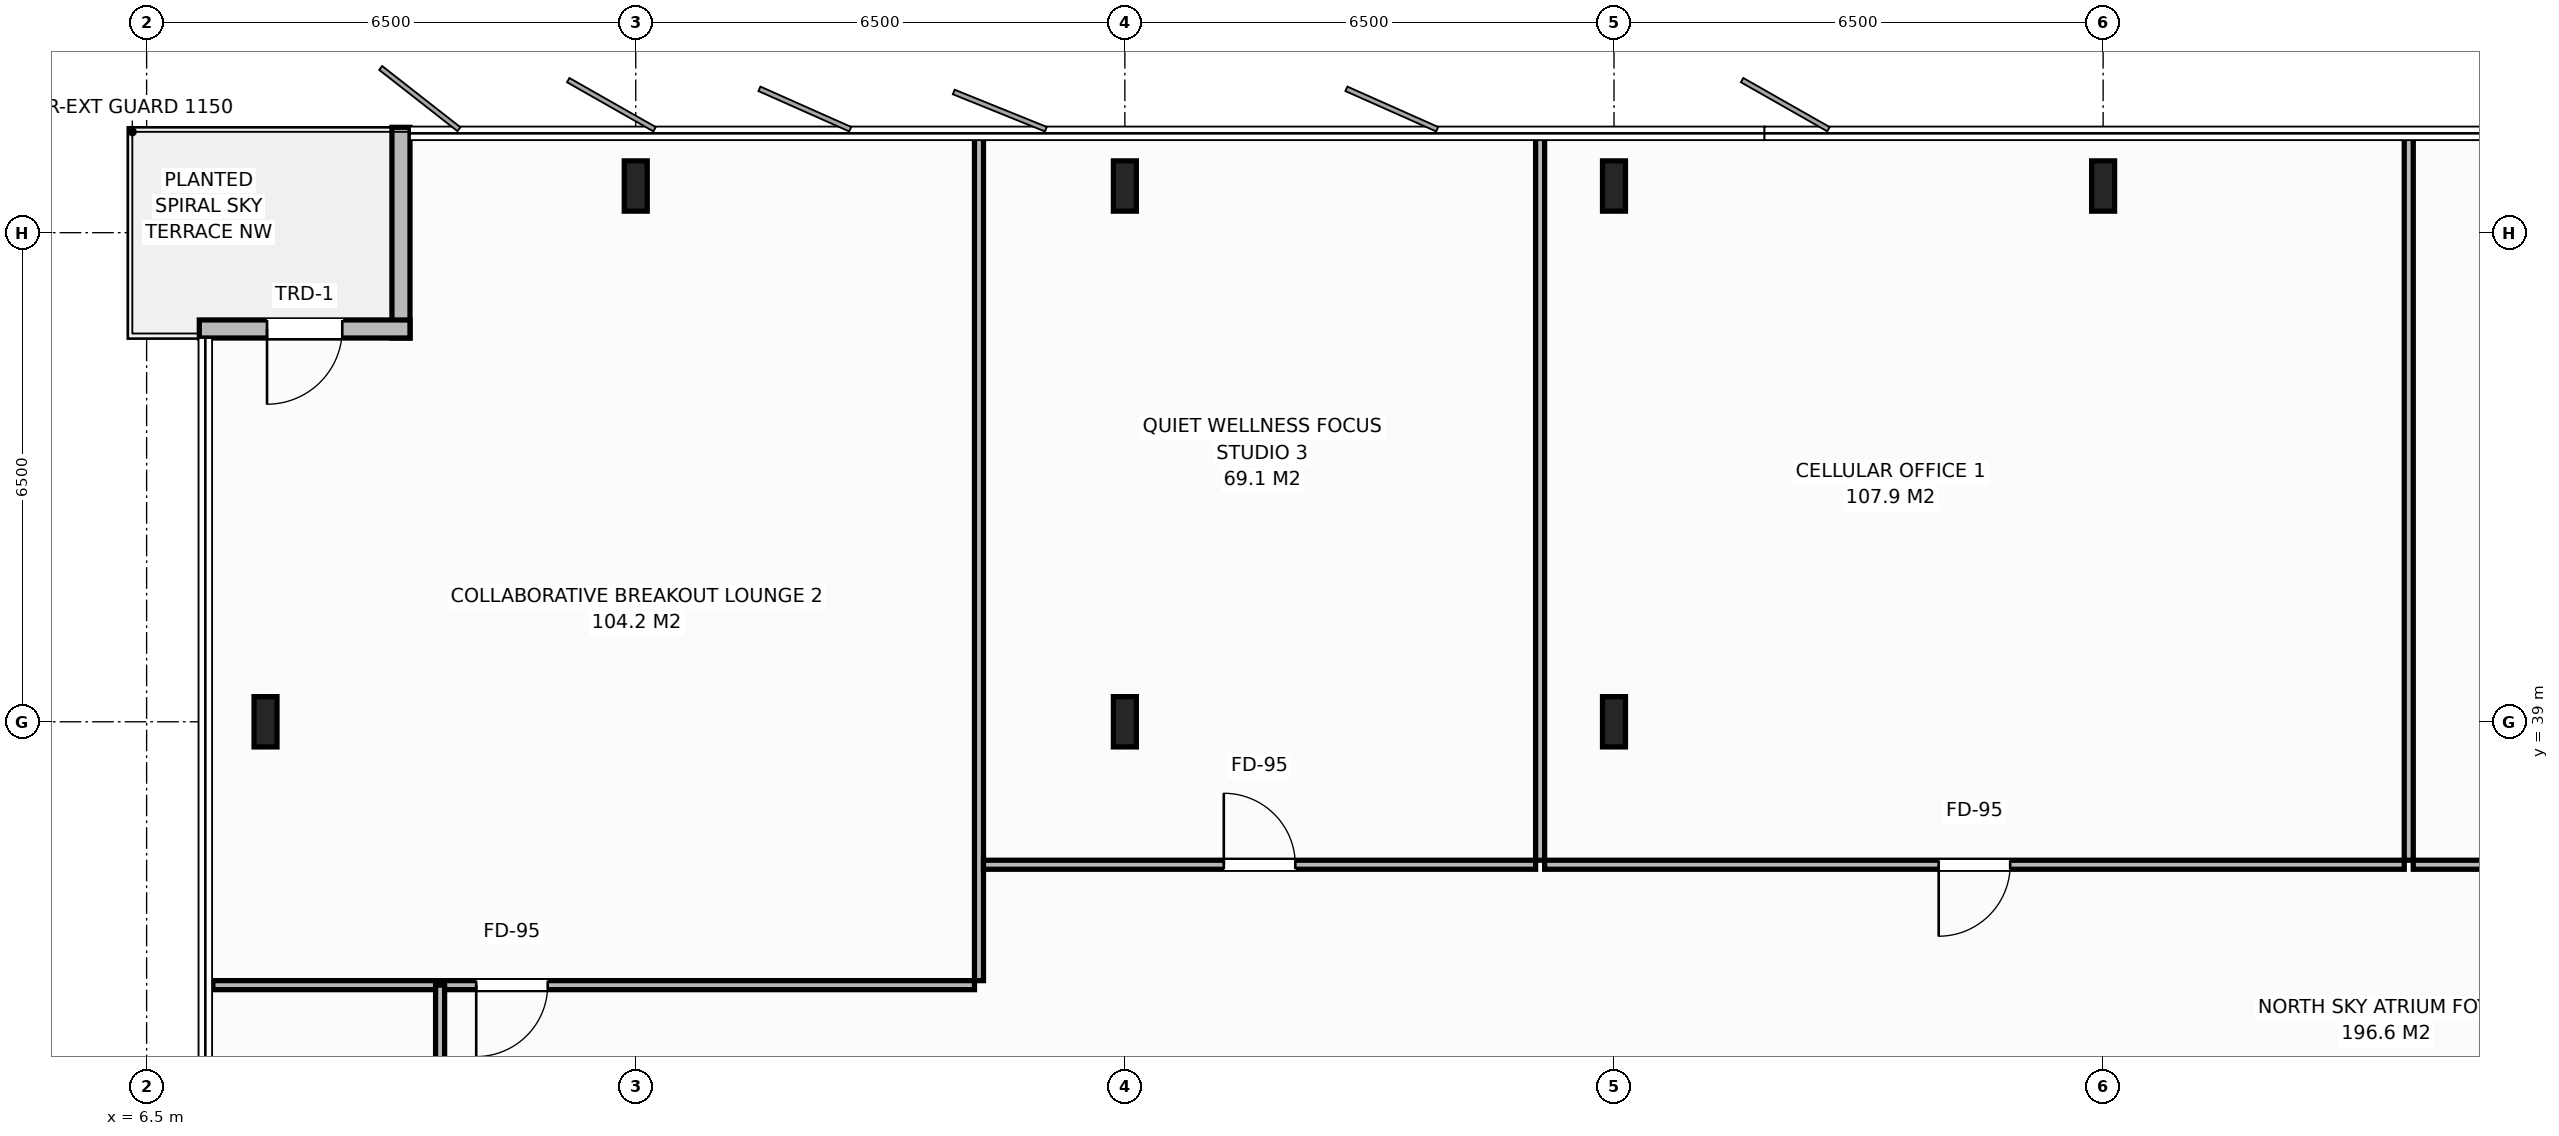
"""IFC4 building model, lengths in metres.
Left out: names, types, materials, properties, quantities, classifications, styles, units other than length and angle.
Written with IfcOpenShell. Run it as: python <this file> out.ifc"""

import sys

from ifc_helpers import new_model, si_unit, direction, frame, frame_2d, origin, origin_2d, place, context, subcontext, project, spatial, rectangle, i_section, extrude, element, fill, save


model = new_model("IFC4")
c1 = context("Model", 3, precision=1e-05, world=origin(), true_north=direction((0.0, 1.0)))
c2 = subcontext(c1, "Body", "Model", "MODEL_VIEW")
j1 = project(units=[si_unit("LENGTHUNIT", "METRE"), si_unit("PLANEANGLEUNIT", "RADIAN")], contexts=[c1])
p1 = place(None, origin())
s1 = spatial("IfcSite", under=j1, at=p1, CompositionType="ELEMENT")
p2 = place(p1, origin())
s2 = spatial("IfcBuilding", under=s1, at=p2, CompositionType="ELEMENT")
p3 = place(p2, frame((0.0, 0.0, 270.8)))
s3 = spatial("IfcBuildingStorey", under=s2, at=p3, CompositionType="ELEMENT", Elevation=270.8)
for number, where, z_axis, x_axis in (
    (1, (19.5, 39.0, 0.0), (0.0, 0.0, 1.0), (1.0, 0.0, 0.0)),
    (2, (26.0, 39.0, 0.0), (0.0, 0.0, 1.0), (1.0, 0.0, 0.0)),
    (3, (13.0, 46.12, 0.0), (0.0, 0.0, 1.0), (1.0, 0.0, 0.0)),
    (4, (19.5, 46.12, 0.0), (0.0, 0.0, 1.0), (1.0, 0.0, 0.0)),
    (5, (26.0, 46.12, 0.0), (0.0, 0.0, 1.0), (1.0, 0.0, 0.0)),
    (6, (32.5, 46.12, 0.0), (0.0, 0.0, 1.0), (1.0, 0.0, 0.0)),
    (7, (8.08, 39.0, 0.0), (0.0, 0.0, 1.0), (1.0, 0.0, 0.0)),
):
    element("IfcColumn", number, at=place(p3, frame(where, z_axis=z_axis, x_axis=x_axis)), inside=s3, PredefinedType="COLUMN", context=c2, shape_type="SweptSolid", body=[
        extrude(i_section(OverallWidth=0.305, OverallDepth=0.668, WebThickness=0.021, FlangeThickness=0.04, at=origin_2d()), origin(), (0.0, 0.0, 1.0), 3.8),
    ])
p4 = place(p3, frame((9.88, 44.1, 0.0), z_axis=(0.0, 0.0, 1.0), x_axis=(0.0, 1.0, 0.0)))
e8 = element("IfcWall", 8, at=p4, inside=s3, PredefinedType="STANDARD", context=c2, shape_type="SweptSolid", body=[
    extrude(rectangle(XDim=2.8, YDim=0.24, at=frame_2d((1.4, 0.0))), origin(), (0.0, 0.0, 1.0), 3.588),
])
p5 = place(p3, frame((7.2, 44.22, 0.0), z_axis=(0.0, 0.0, 1.0), x_axis=(1.0, 0.0, 0.0)))
e9 = element("IfcWall", 9, at=p5, inside=s3, PredefinedType="STANDARD", context=c2, shape_type="SweptSolid", body=[
    extrude(rectangle(XDim=2.8, YDim=0.24, at=frame_2d((1.4, 0.0))), origin(), (0.0, 0.0, 1.0), 3.588),
])
p6 = place(p5, frame((0.9, 0.0, 0.0)))
e10 = element("IfcOpeningElement", 10, at=p6, cuts=e9, PredefinedType="OPENING", context=c2, shape_type="SweptSolid", body=[
    extrude(rectangle(XDim=1.0, YDim=2.2, at=frame_2d((0.5, 1.1))), frame((0.0, 0.13, 0.0), z_axis=(0.0, -1.0, 0.0), x_axis=(1.0, 0.0, 0.0)), (0.0, 0.0, 1.0), 0.26),
])
p7 = place(p3, frame((17.561, 35.56, 0.0), z_axis=(0.0, 0.0, 1.0), x_axis=(0.0, 1.0, 0.0)))
e11 = element("IfcWall", 11, at=p7, inside=s3, PredefinedType="PARTITIONING", context=c2, shape_type="SweptSolid", body=[
    extrude(rectangle(XDim=11.32, YDim=0.12, at=frame_2d((5.66, 0.0))), origin(), (0.0, 0.0, 1.0), 3.588),
])
p8 = place(p3, frame((7.38, 35.5, 0.0), z_axis=(0.0, 0.0, 1.0), x_axis=(1.0, 0.0, 0.0)))
e12 = element("IfcWall", 12, at=p8, inside=s3, PredefinedType="PARTITIONING", context=c2, shape_type="SweptSolid", body=[
    extrude(rectangle(XDim=10.121, YDim=0.12, at=frame_2d((5.061, 0.0))), origin(), (0.0, 0.0, 1.0), 3.588),
])
p9 = place(p8, frame((3.5, 0.0, 0.0)))
e13 = element("IfcOpeningElement", 13, at=p9, cuts=e12, PredefinedType="OPENING", context=c2, shape_type="SweptSolid", body=[
    extrude(rectangle(XDim=0.95, YDim=2.15, at=frame_2d((0.475, 1.075))), frame((0.0, 0.07, 0.0), z_axis=(0.0, -1.0, 0.0), x_axis=(1.0, 0.0, 0.0)), (0.0, 0.0, 1.0), 0.14),
])
p10 = place(p3, frame((25.018, 37.16, 0.0), z_axis=(0.0, 0.0, 1.0), x_axis=(0.0, 1.0, 0.0)))
e14 = element("IfcWall", 14, at=p10, inside=s3, PredefinedType="PARTITIONING", context=c2, shape_type="SweptSolid", body=[
    extrude(rectangle(XDim=9.72, YDim=0.12, at=frame_2d((4.86, 0.0))), origin(), (0.0, 0.0, 1.0), 3.588),
])
p11 = place(p3, frame((17.621, 37.1, 0.0), z_axis=(0.0, 0.0, 1.0), x_axis=(1.0, 0.0, 0.0)))
e15 = element("IfcWall", 15, at=p11, inside=s3, PredefinedType="PARTITIONING", context=c2, shape_type="SweptSolid", body=[
    extrude(rectangle(XDim=7.337, YDim=0.12, at=frame_2d((3.668, 0.0))), origin(), (0.0, 0.0, 1.0), 3.588),
])
p12 = place(p11, frame((3.193, 0.0, 0.0)))
e16 = element("IfcOpeningElement", 16, at=p12, cuts=e15, PredefinedType="OPENING", context=c2, shape_type="SweptSolid", body=[
    extrude(rectangle(XDim=0.95, YDim=2.15, at=frame_2d((0.475, 1.075))), frame((0.0, 0.07, 0.0), z_axis=(0.0, -1.0, 0.0), x_axis=(1.0, 0.0, 0.0)), (0.0, 0.0, 1.0), 0.14),
])
p13 = place(p3, frame((36.562, 37.16, 0.0), z_axis=(0.0, 0.0, 1.0), x_axis=(0.0, 1.0, 0.0)))
e17 = element("IfcWall", 17, at=p13, inside=s3, PredefinedType="PARTITIONING", context=c2, shape_type="SweptSolid", body=[
    extrude(rectangle(XDim=9.72, YDim=0.12, at=frame_2d((4.86, 0.0))), origin(), (0.0, 0.0, 1.0), 3.588),
])
p14 = place(p3, frame((25.078, 37.1, 0.0), z_axis=(0.0, 0.0, 1.0), x_axis=(1.0, 0.0, 0.0)))
e18 = element("IfcWall", 18, at=p14, inside=s3, PredefinedType="PARTITIONING", context=c2, shape_type="SweptSolid", body=[
    extrude(rectangle(XDim=11.424, YDim=0.12, at=frame_2d((5.712, 0.0))), origin(), (0.0, 0.0, 1.0), 3.588),
])
p15 = place(p14, frame((5.237, 0.0, 0.0)))
e19 = element("IfcOpeningElement", 19, at=p15, cuts=e18, PredefinedType="OPENING", context=c2, shape_type="SweptSolid", body=[
    extrude(rectangle(XDim=0.95, YDim=2.15, at=frame_2d((0.475, 1.075))), frame((0.0, 0.07, 0.0), z_axis=(0.0, -1.0, 0.0), x_axis=(1.0, 0.0, 0.0)), (0.0, 0.0, 1.0), 0.14),
])
p16 = place(p3, frame((36.622, 37.1, 0.0), z_axis=(0.0, 0.0, 1.0), x_axis=(1.0, 0.0, 0.0)))
e20 = element("IfcWall", 20, at=p16, inside=s3, PredefinedType="PARTITIONING", context=c2, shape_type="SweptSolid", body=[
    extrude(rectangle(XDim=8.699, YDim=0.12, at=frame_2d((4.35, 0.0))), origin(), (0.0, 0.0, 1.0), 3.588),
])
p17 = place(p16, frame((3.875, 0.0, 0.0)))
e21 = element("IfcOpeningElement", 21, at=p17, cuts=e20, PredefinedType="OPENING", context=c2, shape_type="SweptSolid", body=[
    extrude(rectangle(XDim=0.95, YDim=2.15, at=frame_2d((0.475, 1.075))), frame((0.0, 0.07, 0.0), z_axis=(0.0, -1.0, 0.0), x_axis=(1.0, 0.0, 0.0)), (0.0, 0.0, 1.0), 0.14),
])
p18 = place(p3, frame((10.4, 16.5, 0.0), z_axis=(0.0, 0.0, 1.0), x_axis=(0.0, 1.0, 0.0)))
e22 = element("IfcWall", 22, at=p18, inside=s3, PredefinedType="PARTITIONING", context=c2, shape_type="SweptSolid", body=[
    extrude(rectangle(XDim=19.0, YDim=0.12, at=frame_2d((9.5, 0.0))), origin(), (0.0, 0.0, 1.0), 3.588),
])
p19 = place(p18, frame((9.025, 0.0, 0.0)))
e23 = element("IfcOpeningElement", 23, at=p19, cuts=e22, PredefinedType="OPENING", context=c2, shape_type="SweptSolid", body=[
    extrude(rectangle(XDim=0.95, YDim=2.15, at=frame_2d((0.475, 1.075))), frame((0.0, 0.07, 0.0), z_axis=(0.0, -1.0, 0.0), x_axis=(1.0, 0.0, 0.0)), (0.0, 0.0, 1.0), 0.14),
])
p20 = place(p6, origin())
e24 = element("IfcDoor", 24, at=p20, inside=s3, OperationType="SINGLE_SWING_RIGHT", PredefinedType="DOOR", context=c2, shape_type="SweptSolid", body=[
    extrude(rectangle(XDim=1.0, YDim=2.2, at=frame_2d((0.5, 1.1))), frame((0.0, 0.025, 0.0), z_axis=(0.0, -1.0, 0.0), x_axis=(1.0, 0.0, 0.0)), (0.0, 0.0, 1.0), 0.05),
])
fill(e10, e24)
p21 = place(p9, origin())
e25 = element("IfcDoor", 25, at=p21, inside=s3, OperationType="SINGLE_SWING_RIGHT", PredefinedType="DOOR", context=c2, shape_type="SweptSolid", body=[
    extrude(rectangle(XDim=0.95, YDim=2.15, at=frame_2d((0.475, 1.075))), frame((0.0, 0.025, 0.0), z_axis=(0.0, -1.0, 0.0), x_axis=(1.0, 0.0, 0.0)), (0.0, 0.0, 1.0), 0.05),
])
fill(e13, e25)
p22 = place(p12, origin())
e26 = element("IfcDoor", 26, at=p22, inside=s3, OperationType="SINGLE_SWING_LEFT", PredefinedType="DOOR", context=c2, shape_type="SweptSolid", body=[
    extrude(rectangle(XDim=0.95, YDim=2.15, at=frame_2d((0.475, 1.075))), frame((0.0, 0.025, 0.0), z_axis=(0.0, -1.0, 0.0), x_axis=(1.0, 0.0, 0.0)), (0.0, 0.0, 1.0), 0.05),
])
fill(e16, e26)
p23 = place(p15, origin())
e27 = element("IfcDoor", 27, at=p23, inside=s3, OperationType="SINGLE_SWING_RIGHT", PredefinedType="DOOR", context=c2, shape_type="SweptSolid", body=[
    extrude(rectangle(XDim=0.95, YDim=2.15, at=frame_2d((0.475, 1.075))), frame((0.0, 0.025, 0.0), z_axis=(0.0, -1.0, 0.0), x_axis=(1.0, 0.0, 0.0)), (0.0, 0.0, 1.0), 0.05),
])
fill(e19, e27)
save(model, sys.argv[1])
